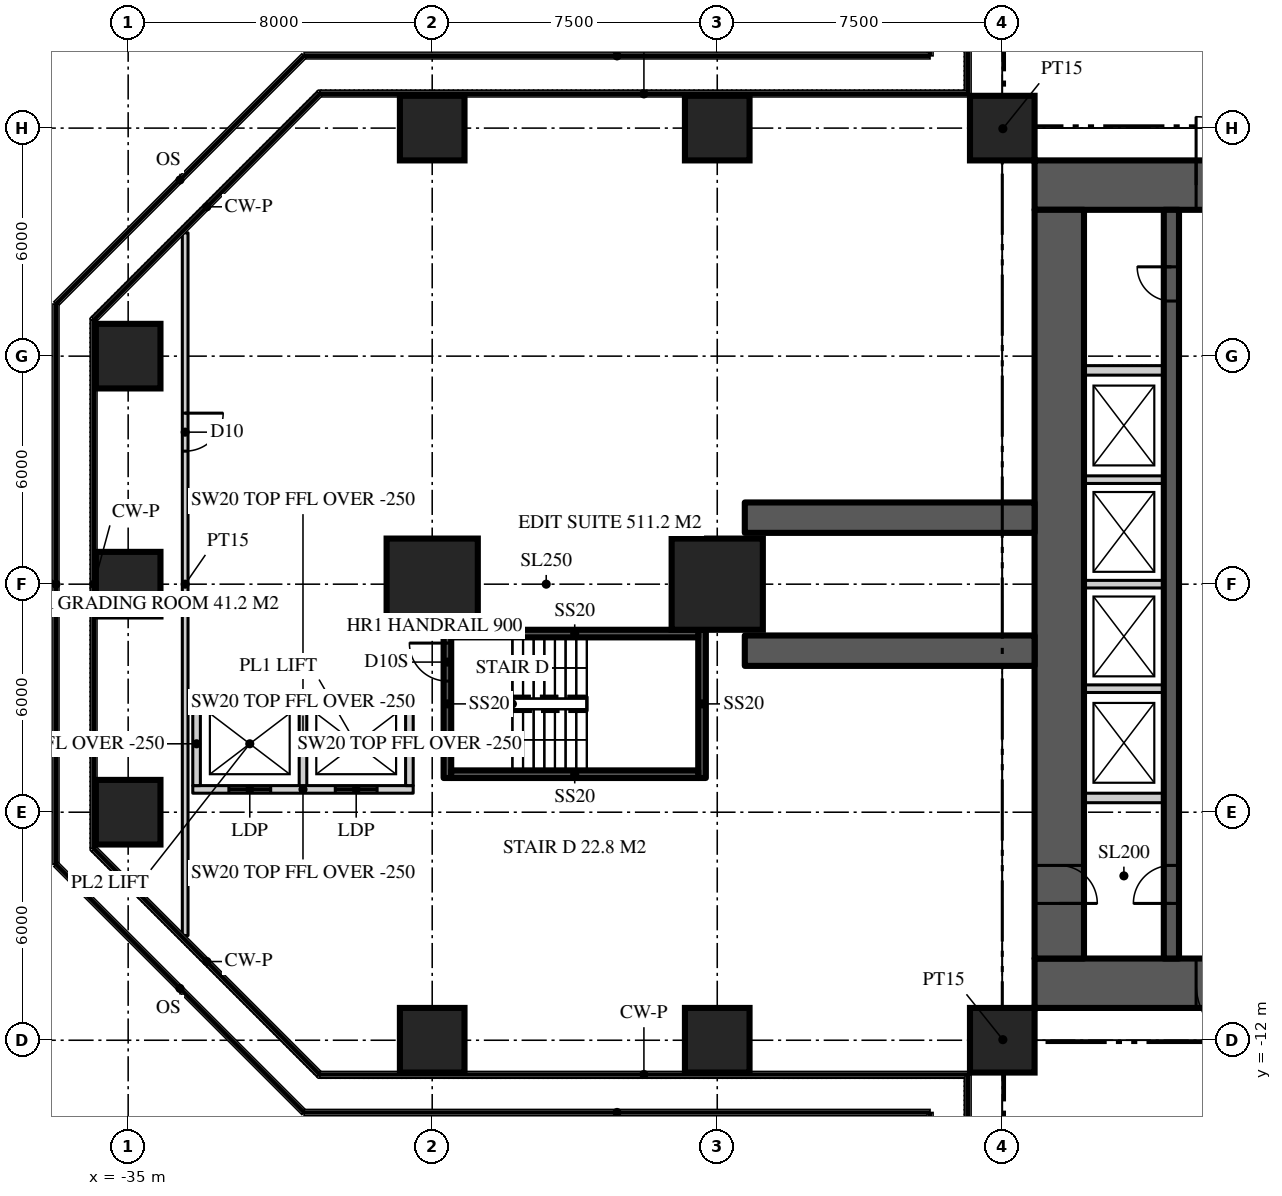
"""IFC4 building model, lengths in metres.
Left out: names, types, materials, properties, quantities, classifications, styles, units other than length and angle.
Written with IfcOpenShell. Run it as: python <this file> out.ifc"""

import sys

from ifc_helpers import new_model, si_unit, direction, frame, frame_2d, origin, origin_2d, place, context, subcontext, project, spatial, rectangle, extrude, element, fill, save


model = new_model("IFC4")
c1 = context("Model", 3, precision=1e-05, world=origin(), true_north=direction((0.0, 1.0)))
c2 = subcontext(c1, "Body", "Model", "MODEL_VIEW")
j1 = project(units=[si_unit("LENGTHUNIT", "METRE"), si_unit("PLANEANGLEUNIT", "RADIAN")], contexts=[c1])
p1 = place(None, origin())
s1 = spatial("IfcSite", under=j1, at=p1, CompositionType="ELEMENT")
p2 = place(p1, origin())
s2 = spatial("IfcBuilding", under=s1, at=p2, CompositionType="ELEMENT")
p3 = place(p2, frame((0.0, 0.0, 23.0)))
s3 = spatial("IfcBuildingStorey", under=s2, at=p3, CompositionType="ELEMENT", Elevation=23.0)
p4 = place(p3, frame((-11.15, 10.5, 0.0), z_axis=(0.0, 0.0, 1.0), x_axis=(1.0, 0.0, 0.0)))
e1 = element("IfcWall", 1, at=p4, inside=s3, PredefinedType="SHEAR", context=c2, shape_type="SweptSolid", body=[
    extrude(rectangle(XDim=22.3, YDim=1.3, at=frame_2d((11.15, 0.0))), origin(), (0.0, 0.0, 1.0), 5.0),
])
p5 = place(p4, frame((4.25, 0.0, 0.0)))
e2 = element("IfcOpeningElement", 2, at=p5, cuts=e1, PredefinedType="OPENING", context=c2, shape_type="SweptSolid", body=[
    extrude(rectangle(XDim=1.8, YDim=2.2, at=frame_2d((0.9, 1.1))), frame((0.0, 0.66, 0.0), z_axis=(0.0, -1.0, 0.0), x_axis=(1.0, 0.0, 0.0)), (0.0, 0.0, 1.0), 1.32),
])
p6 = place(p4, frame((16.25, 0.0, 0.0)))
e3 = element("IfcOpeningElement", 3, at=p6, cuts=e1, PredefinedType="OPENING", context=c2, shape_type="SweptSolid", body=[
    extrude(rectangle(XDim=1.8, YDim=2.2, at=frame_2d((0.9, 1.1))), frame((0.0, 0.66, 0.0), z_axis=(0.0, -1.0, 0.0), x_axis=(1.0, 0.0, 0.0)), (0.0, 0.0, 1.0), 1.32),
])
p7 = place(p3, frame((11.15, -10.5, 0.0), z_axis=(0.0, 0.0, 1.0), x_axis=(-1.0, 0.0, 0.0)))
e4 = element("IfcWall", 4, at=p7, inside=s3, PredefinedType="SHEAR", context=c2, shape_type="SweptSolid", body=[
    extrude(rectangle(XDim=22.3, YDim=1.3, at=frame_2d((11.15, 0.0))), origin(), (0.0, 0.0, 1.0), 5.0),
])
p8 = place(p7, frame((16.25, 0.0, 0.0)))
e5 = element("IfcOpeningElement", 5, at=p8, cuts=e4, PredefinedType="OPENING", context=c2, shape_type="SweptSolid", body=[
    extrude(rectangle(XDim=1.8, YDim=2.2, at=frame_2d((0.9, 1.1))), frame((0.0, 0.66, 0.0), z_axis=(0.0, -1.0, 0.0), x_axis=(1.0, 0.0, 0.0)), (0.0, 0.0, 1.0), 1.32),
])
p9 = place(p7, frame((4.25, 0.0, 0.0)))
e6 = element("IfcOpeningElement", 6, at=p9, cuts=e4, PredefinedType="OPENING", context=c2, shape_type="SweptSolid", body=[
    extrude(rectangle(XDim=1.8, YDim=2.2, at=frame_2d((0.9, 1.1))), frame((0.0, 0.66, 0.0), z_axis=(0.0, -1.0, 0.0), x_axis=(1.0, 0.0, 0.0)), (0.0, 0.0, 1.0), 1.32),
])
p10 = place(p3, frame((-10.5, 9.85, 0.0), z_axis=(0.0, 0.0, 1.0), x_axis=(0.0, -1.0, 0.0)))
e7 = element("IfcWall", 7, at=p10, inside=s3, PredefinedType="SHEAR", context=c2, shape_type="SweptSolid", body=[
    extrude(rectangle(XDim=19.7, YDim=1.3, at=frame_2d((9.85, 0.0))), origin(), (0.0, 0.0, 1.0), 5.0),
])
p11 = place(p10, frame((17.25, 0.0, 0.0)))
e8 = element("IfcOpeningElement", 8, at=p11, cuts=e7, PredefinedType="OPENING", context=c2, shape_type="SweptSolid", body=[
    extrude(rectangle(XDim=1.0, YDim=2.2, at=frame_2d((0.5, 1.1))), frame((0.0, 0.66, 0.0), z_axis=(0.0, -1.0, 0.0), x_axis=(1.0, 0.0, 0.0)), (0.0, 0.0, 1.0), 1.32),
])
for number, where, z_axis, x_axis in (
    (9, (-11.15, 1.75, 0.0), (0.0, 0.0, 1.0), (-1.0, 0.0, 0.0)),
    (10, (-11.15, -1.75, 0.0), (0.0, 0.0, 1.0), (-1.0, 0.0, 0.0)),
):
    element("IfcWall", number, at=place(p3, frame(where, z_axis=z_axis, x_axis=x_axis)), inside=s3, PredefinedType="SHEAR", context=c2, shape_type="SweptSolid", body=[
        extrude(rectangle(XDim=7.625, YDim=0.8, at=frame_2d((3.812, 0.0))), origin(), (0.0, 0.0, 1.0), 5.0),
    ])
for number, where, z_axis, x_axis in (
    (11, (-27.0, -12.0, 0.0), (0.0, 0.0, 1.0), (1.0, 0.0, 0.0)),
    (12, (-19.5, -12.0, 0.0), (0.0, 0.0, 1.0), (1.0, 0.0, 0.0)),
    (13, (-12.0, -12.0, 0.0), (0.0, 0.0, 1.0), (1.0, 0.0, 0.0)),
    (14, (-35.0, -6.0, 0.0), (0.0, 0.0, 1.0), (1.0, 0.0, 0.0)),
    (15, (-35.0, 0.0, 0.0), (0.0, 0.0, 1.0), (1.0, 0.0, 0.0)),
):
    element("IfcColumn", number, at=place(p3, frame(where, z_axis=z_axis, x_axis=x_axis)), inside=s3, PredefinedType="COLUMN", context=c2, shape_type="SweptSolid", body=[
        extrude(rectangle(XDim=1.7, YDim=1.7, at=origin_2d()), origin(), (0.0, 0.0, 1.0), 5.0),
    ])
for number, where, z_axis, x_axis in (
    (16, (-27.0, 0.0, 0.0), (0.0, 0.0, 1.0), (1.0, 0.0, 0.0)),
    (17, (-19.5, 0.0, 0.0), (0.0, 0.0, 1.0), (1.0, 0.0, 0.0)),
):
    element("IfcColumn", number, at=place(p3, frame(where, z_axis=z_axis, x_axis=x_axis)), inside=s3, PredefinedType="COLUMN", context=c2, shape_type="SweptSolid", body=[
        extrude(rectangle(XDim=2.4, YDim=2.4, at=origin_2d()), origin(), (0.0, 0.0, 1.0), 5.0),
    ])
for number, where, z_axis, x_axis in (
    (18, (-35.0, 6.0, 0.0), (0.0, 0.0, 1.0), (1.0, 0.0, 0.0)),
    (19, (-27.0, 12.0, 0.0), (0.0, 0.0, 1.0), (1.0, 0.0, 0.0)),
    (20, (-19.5, 12.0, 0.0), (0.0, 0.0, 1.0), (1.0, 0.0, 0.0)),
    (21, (-12.0, 12.0, 0.0), (0.0, 0.0, 1.0), (1.0, 0.0, 0.0)),
):
    element("IfcColumn", number, at=place(p3, frame(where, z_axis=z_axis, x_axis=x_axis)), inside=s3, PredefinedType="COLUMN", context=c2, shape_type="SweptSolid", body=[
        extrude(rectangle(XDim=1.7, YDim=1.7, at=origin_2d()), origin(), (0.0, 0.0, 1.0), 5.0),
    ])
p12 = place(p3, frame((-7.55, -9.85, 0.0), z_axis=(0.0, 0.0, 1.0), x_axis=(0.0, 1.0, 0.0)))
e22 = element("IfcWall", 22, at=p12, inside=s3, PredefinedType="SHEAR", context=c2, shape_type="SweptSolid", body=[
    extrude(rectangle(XDim=19.7, YDim=0.4, at=frame_2d((9.85, 0.0))), origin(), (0.0, 0.0, 1.0), 5.0),
])
p13 = place(p12, frame((1.45, 0.0, 0.0)))
e23 = element("IfcOpeningElement", 23, at=p13, cuts=e22, PredefinedType="OPENING", context=c2, shape_type="SweptSolid", body=[
    extrude(rectangle(XDim=1.0, YDim=2.2, at=frame_2d((0.5, 1.1))), frame((0.0, 0.21, 0.0), z_axis=(0.0, -1.0, 0.0), x_axis=(1.0, 0.0, 0.0)), (0.0, 0.0, 1.0), 0.42),
])
p14 = place(p12, frame((17.3, 0.0, 0.0)))
e24 = element("IfcOpeningElement", 24, at=p14, cuts=e22, PredefinedType="OPENING", context=c2, shape_type="SweptSolid", body=[
    extrude(rectangle(XDim=0.9, YDim=2.1, at=frame_2d((0.45, 1.05))), frame((0.0, 0.21, 0.0), z_axis=(0.0, -1.0, 0.0), x_axis=(1.0, 0.0, 0.0)), (0.0, 0.0, 1.0), 0.42),
])
for number, where, z_axis, x_axis in (
    (25, (-9.85, 5.625, 0.0), (0.0, 0.0, 1.0), (1.0, 0.0, 0.0)),
    (26, (-9.85, -5.625, 0.0), (0.0, 0.0, 1.0), (1.0, 0.0, 0.0)),
):
    element("IfcWall", number, at=place(p3, frame(where, z_axis=z_axis, x_axis=x_axis)), inside=s3, PredefinedType="SOLIDWALL", context=c2, shape_type="SweptSolid", body=[
        extrude(rectangle(XDim=2.1, YDim=0.25, at=frame_2d((1.05, 0.0))), origin(), (0.0, 0.0, 1.0), 4.8),
    ])
for number, where, z_axis, x_axis in (
    (27, (-9.85, -2.75, 0.0), (0.0, 0.0, 1.0), (1.0, 0.0, 0.0)),
    (28, (-9.85, 0.0, 0.0), (0.0, 0.0, 1.0), (1.0, 0.0, 0.0)),
    (29, (-9.85, 2.75, 0.0), (0.0, 0.0, 1.0), (1.0, 0.0, 0.0)),
):
    element("IfcWall", number, at=place(p3, frame(where, z_axis=z_axis, x_axis=x_axis)), inside=s3, PredefinedType="SOLIDWALL", context=c2, shape_type="SweptSolid", body=[
        extrude(rectangle(XDim=2.1, YDim=0.2, at=frame_2d((1.05, 0.0))), origin(), (0.0, 0.0, 1.0), 4.8),
    ])
p15 = place(p3, frame((-33.5, 9.245, 0.0), z_axis=(0.0, 0.0, 1.0), x_axis=(0.0, -1.0, 0.0)))
e30 = element("IfcWall", 30, at=p15, inside=s3, PredefinedType="PARTITIONING", context=c2, shape_type="SweptSolid", body=[
    extrude(rectangle(XDim=18.491, YDim=0.15, at=frame_2d((9.245, 0.0))), origin(), (0.0, 0.0, 1.0), 4.75),
])
p16 = place(p15, frame((4.745, 0.0, 0.0)))
e31 = element("IfcOpeningElement", 31, at=p16, cuts=e30, PredefinedType="OPENING", context=c2, shape_type="SweptSolid", body=[
    extrude(rectangle(XDim=1.0, YDim=2.2, at=frame_2d((0.5, 1.1))), frame((0.0, 0.085, 0.0), z_axis=(0.0, -1.0, 0.0), x_axis=(1.0, 0.0, 0.0)), (0.0, 0.0, 1.0), 0.17),
])
for number, where, z_axis, x_axis in (
    (32, (-11.15, 11.15, 0.0), (0.0, 0.0, 1.0), (-0.707, 0.707, 0.0)),
    (33, (-11.15, -11.15, 0.0), (0.0, 0.0, 1.0), (-0.707, -0.707, 0.0)),
):
    element("IfcWall", number, at=place(p3, frame(where, z_axis=z_axis, x_axis=x_axis)), inside=s3, PredefinedType="PARTITIONING", context=c2, shape_type="SweptSolid", body=[
        extrude(rectangle(XDim=2.362, YDim=0.15, at=frame_2d((1.181, 0.0))), origin(), (0.0, 0.0, 1.0), 4.75),
    ])
p17 = place(p3, frame((-27.5, -3.0, 0.0), z_axis=(0.0, 0.0, 1.0), x_axis=(-1.0, 0.0, 0.0)))
e34 = element("IfcWall", 34, at=p17, inside=s3, PredefinedType="SOLIDWALL", context=c2, shape_type="SweptSolid", body=[
    extrude(rectangle(XDim=5.8, YDim=0.2, at=frame_2d((2.9, 0.0))), origin(), (0.0, 0.0, 1.0), 4.75),
])
p18 = place(p3, frame((-33.3, -5.4, 0.0), z_axis=(0.0, 0.0, 1.0), x_axis=(1.0, 0.0, 0.0)))
e35 = element("IfcWall", 35, at=p18, inside=s3, PredefinedType="SOLIDWALL", context=c2, shape_type="SweptSolid", body=[
    extrude(rectangle(XDim=5.8, YDim=0.2, at=frame_2d((2.9, 0.0))), origin(), (0.0, 0.0, 1.0), 4.75),
])
p19 = place(p18, frame((3.75, 0.0, 0.0)))
e36 = element("IfcOpeningElement", 36, at=p19, cuts=e35, PredefinedType="OPENING", context=c2, shape_type="SweptSolid", body=[
    extrude(rectangle(XDim=1.1, YDim=2.2, at=frame_2d((0.55, 1.1))), frame((0.0, 0.11, 0.0), z_axis=(0.0, -1.0, 0.0), x_axis=(1.0, 0.0, 0.0)), (0.0, 0.0, 1.0), 0.22),
])
p20 = place(p18, frame((0.95, 0.0, 0.0)))
e37 = element("IfcOpeningElement", 37, at=p20, cuts=e35, PredefinedType="OPENING", context=c2, shape_type="SweptSolid", body=[
    extrude(rectangle(XDim=1.1, YDim=2.2, at=frame_2d((0.55, 1.1))), frame((0.0, 0.11, 0.0), z_axis=(0.0, -1.0, 0.0), x_axis=(1.0, 0.0, 0.0)), (0.0, 0.0, 1.0), 0.22),
])
for number, where, z_axis, x_axis in (
    (38, (-27.6, -3.1, 0.0), (0.0, 0.0, 1.0), (0.0, -1.0, 0.0)),
    (39, (-30.4, -3.1, 0.0), (0.0, 0.0, 1.0), (0.0, -1.0, 0.0)),
    (40, (-33.2, -3.1, 0.0), (0.0, 0.0, 1.0), (0.0, -1.0, 0.0)),
):
    element("IfcWall", number, at=place(p3, frame(where, z_axis=z_axis, x_axis=x_axis)), inside=s3, PredefinedType="SOLIDWALL", context=c2, shape_type="SweptSolid", body=[
        extrude(rectangle(XDim=2.2, YDim=0.2, at=frame_2d((1.1, 0.0))), origin(), (0.0, 0.0, 1.0), 4.75),
    ])
p21 = place(p3, frame((-19.9, -1.2, 0.0), z_axis=(0.0, 0.0, 1.0), x_axis=(0.0, -1.0, 0.0)))
e41 = element("IfcWall", 41, at=p21, inside=s3, PredefinedType="SOLIDWALL", context=c2, shape_type="SweptSolid", body=[
    extrude(rectangle(XDim=3.9, YDim=0.2, at=frame_2d((1.95, 0.0))), origin(), (0.0, 0.0, 1.0), 4.75),
])
p22 = place(p3, frame((-26.6, -5.1, 0.0), z_axis=(0.0, 0.0, 1.0), x_axis=(0.0, 1.0, 0.0)))
e42 = element("IfcWall", 42, at=p22, inside=s3, PredefinedType="SOLIDWALL", context=c2, shape_type="SweptSolid", body=[
    extrude(rectangle(XDim=3.9, YDim=0.2, at=frame_2d((1.95, 0.0))), origin(), (0.0, 0.0, 1.0), 4.75),
])
p23 = place(p22, frame((2.55, 0.0, 0.0)))
e43 = element("IfcOpeningElement", 43, at=p23, cuts=e42, PredefinedType="OPENING", context=c2, shape_type="SweptSolid", body=[
    extrude(rectangle(XDim=1.0, YDim=2.2, at=frame_2d((0.5, 1.1))), frame((0.0, 0.11, 0.0), z_axis=(0.0, -1.0, 0.0), x_axis=(1.0, 0.0, 0.0)), (0.0, 0.0, 1.0), 0.22),
])
for number, where, z_axis, x_axis in (
    (44, (-20.0, -1.3, 0.0), (0.0, 0.0, 1.0), (-1.0, 0.0, 0.0)),
    (45, (-26.5, -5.0, 0.0), (0.0, 0.0, 1.0), (1.0, 0.0, 0.0)),
):
    element("IfcWall", number, at=place(p3, frame(where, z_axis=z_axis, x_axis=x_axis)), inside=s3, PredefinedType="SOLIDWALL", context=c2, shape_type="SweptSolid", body=[
        extrude(rectangle(XDim=6.5, YDim=0.2, at=frame_2d((3.25, 0.0))), origin(), (0.0, 0.0, 1.0), 4.75),
    ])
p24 = place(p19, origin())
e46 = element("IfcDoor", 46, at=p24, inside=s3, OperationType="SLIDING_TO_LEFT", PredefinedType="DOOR", context=c2, shape_type="SweptSolid", body=[
    extrude(rectangle(XDim=1.1, YDim=2.2, at=frame_2d((0.55, 1.1))), frame((0.0, 0.025, 0.0), z_axis=(0.0, -1.0, 0.0), x_axis=(1.0, 0.0, 0.0)), (0.0, 0.0, 1.0), 0.05),
])
fill(e36, e46)
p25 = place(p20, origin())
e47 = element("IfcDoor", 47, at=p25, inside=s3, OperationType="SLIDING_TO_LEFT", PredefinedType="DOOR", context=c2, shape_type="SweptSolid", body=[
    extrude(rectangle(XDim=1.1, YDim=2.2, at=frame_2d((0.55, 1.1))), frame((0.0, 0.025, 0.0), z_axis=(0.0, -1.0, 0.0), x_axis=(1.0, 0.0, 0.0)), (0.0, 0.0, 1.0), 0.05),
])
fill(e37, e47)
p26 = place(p5, origin())
e48 = element("IfcDoor", 48, at=p26, inside=s3, OperationType="DOUBLE_DOOR_DOUBLE_SWING", PredefinedType="DOOR", context=c2, shape_type="SweptSolid", body=[
    extrude(rectangle(XDim=1.8, YDim=2.2, at=frame_2d((0.9, 1.1))), frame((0.0, 0.025, 0.0), z_axis=(0.0, -1.0, 0.0), x_axis=(1.0, 0.0, 0.0)), (0.0, 0.0, 1.0), 0.05),
])
fill(e2, e48)
p27 = place(p8, origin())
e49 = element("IfcDoor", 49, at=p27, inside=s3, OperationType="DOUBLE_DOOR_DOUBLE_SWING", PredefinedType="DOOR", context=c2, shape_type="SweptSolid", body=[
    extrude(rectangle(XDim=1.8, YDim=2.2, at=frame_2d((0.9, 1.1))), frame((0.0, 0.025, 0.0), z_axis=(0.0, -1.0, 0.0), x_axis=(1.0, 0.0, 0.0)), (0.0, 0.0, 1.0), 0.05),
])
fill(e5, e49)
p28 = place(p13, origin())
e50 = element("IfcDoor", 50, at=p28, inside=s3, OperationType="SINGLE_SWING_LEFT", PredefinedType="DOOR", context=c2, shape_type="SweptSolid", body=[
    extrude(rectangle(XDim=1.0, YDim=2.2, at=frame_2d((0.5, 1.1))), frame((0.0, 0.025, 0.0), z_axis=(0.0, -1.0, 0.0), x_axis=(1.0, 0.0, 0.0)), (0.0, 0.0, 1.0), 0.05),
])
fill(e23, e50)
p29 = place(p11, origin())
e51 = element("IfcDoor", 51, at=p29, inside=s3, OperationType="SINGLE_SWING_RIGHT", PredefinedType="DOOR", context=c2, shape_type="SweptSolid", body=[
    extrude(rectangle(XDim=1.0, YDim=2.2, at=frame_2d((0.5, 1.1))), frame((0.0, 0.025, 0.0), z_axis=(0.0, -1.0, 0.0), x_axis=(1.0, 0.0, 0.0)), (0.0, 0.0, 1.0), 0.05),
])
fill(e8, e51)
p30 = place(p14, origin())
e52 = element("IfcDoor", 52, at=p30, inside=s3, OperationType="SINGLE_SWING_RIGHT", PredefinedType="DOOR", context=c2, shape_type="SweptSolid", body=[
    extrude(rectangle(XDim=0.9, YDim=2.1, at=frame_2d((0.45, 1.05))), frame((0.0, 0.025, 0.0), z_axis=(0.0, -1.0, 0.0), x_axis=(1.0, 0.0, 0.0)), (0.0, 0.0, 1.0), 0.05),
])
fill(e24, e52)
p31 = place(p16, origin())
e53 = element("IfcDoor", 53, at=p31, inside=s3, OperationType="SINGLE_SWING_LEFT", PredefinedType="DOOR", context=c2, shape_type="SweptSolid", body=[
    extrude(rectangle(XDim=1.0, YDim=2.2, at=frame_2d((0.5, 1.1))), frame((0.0, 0.025, 0.0), z_axis=(0.0, -1.0, 0.0), x_axis=(1.0, 0.0, 0.0)), (0.0, 0.0, 1.0), 0.05),
])
fill(e31, e53)
p32 = place(p23, origin())
e54 = element("IfcDoor", 54, at=p32, inside=s3, OperationType="SINGLE_SWING_RIGHT", PredefinedType="DOOR", context=c2, shape_type="SweptSolid", body=[
    extrude(rectangle(XDim=1.0, YDim=2.2, at=frame_2d((0.5, 1.1))), frame((0.0, 0.025, 0.0), z_axis=(0.0, -1.0, 0.0), x_axis=(1.0, 0.0, 0.0)), (0.0, 0.0, 1.0), 0.05),
])
fill(e43, e54)
save(model, sys.argv[1])
